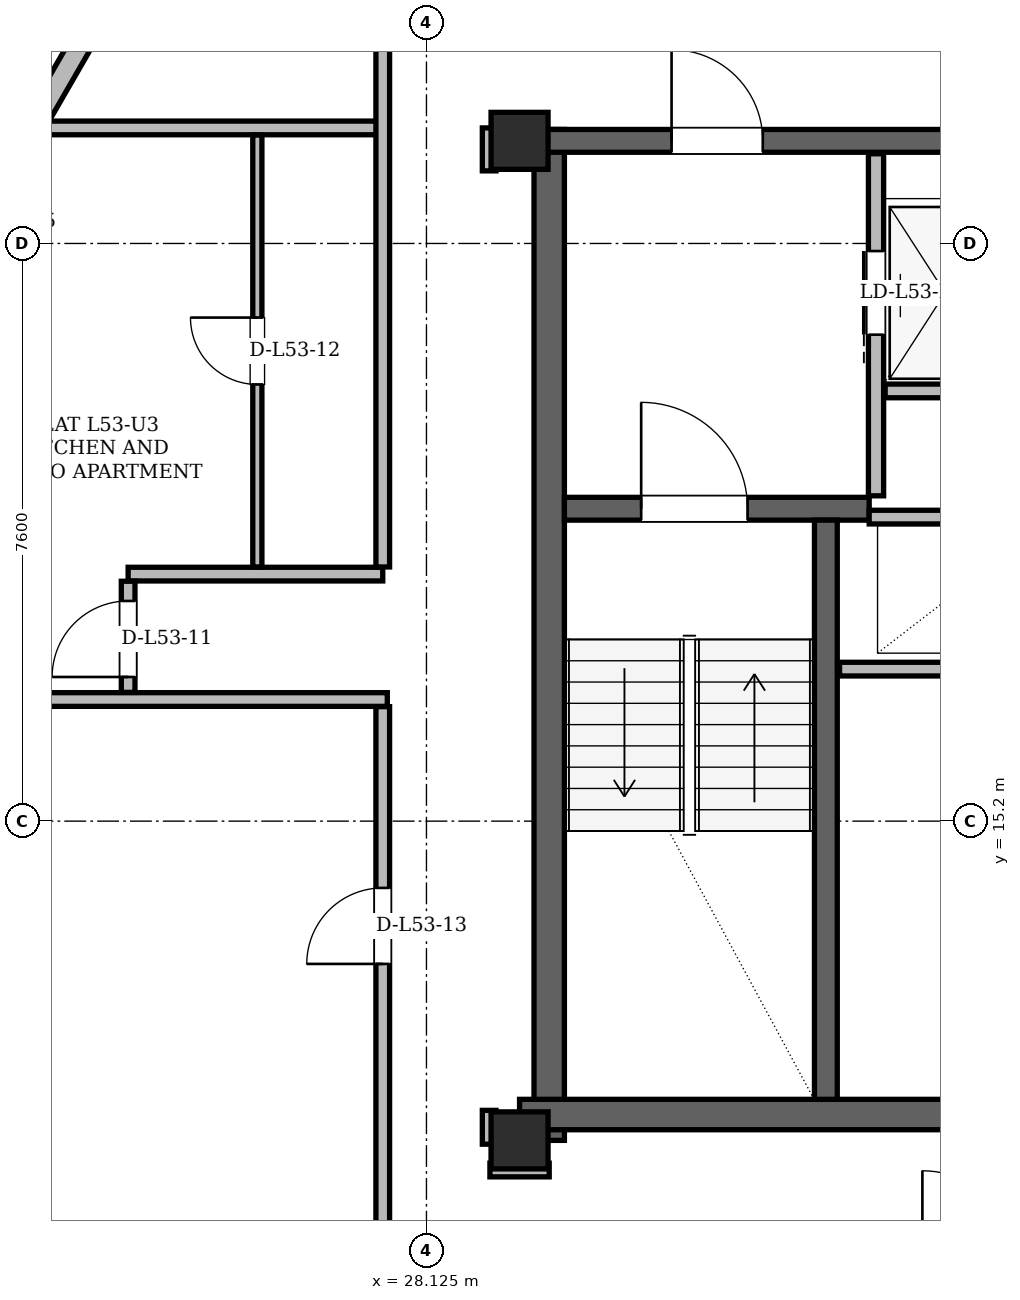
"""IFC4 building model, lengths in metres.
Left out: names, types, materials, properties, quantities, classifications, styles, units other than length and angle.
Written with IfcOpenShell. Run it as: python <this file> out.ifc"""

import sys

from ifc_helpers import new_model, si_unit, direction, frame, frame_2d, origin, origin_2d, place, context, subcontext, project, spatial, rectangle, hollow_rectangle, extrude, element, fill, save


model = new_model("IFC4")
c1 = context("Model", 3, precision=1e-05, world=origin(), true_north=direction((0.0, 1.0)))
c2 = subcontext(c1, "Body", "Model", "MODEL_VIEW")
j1 = project(units=[si_unit("LENGTHUNIT", "METRE"), si_unit("PLANEANGLEUNIT", "RADIAN")], contexts=[c1])
p1 = place(None, origin())
s1 = spatial("IfcSite", under=j1, at=p1, CompositionType="ELEMENT")
p2 = place(p1, origin())
s2 = spatial("IfcBuilding", under=s1, at=p2, CompositionType="ELEMENT")
p3 = place(p2, frame((0.0, 0.0, 201.0)))
s3 = spatial("IfcBuildingStorey", under=s2, at=p3, CompositionType="ELEMENT", Elevation=201.0)
for number, where, z_axis, x_axis in (
    (1, (29.35, 11.0, 0.0), (0.0, 0.0, 1.0), (1.0, 0.0, 0.0)),
    (2, (29.35, 24.15, 0.0), (0.0, 0.0, 1.0), (1.0, 0.0, 0.0)),
):
    element("IfcColumn", number, at=place(p3, frame(where, z_axis=z_axis, x_axis=x_axis)), inside=s3, PredefinedType="COLUMN", context=c2, shape_type="SweptSolid", body=[
        extrude(hollow_rectangle(XDim=0.75, YDim=0.75, WallThickness=0.06, at=origin_2d()), origin(), (0.0, 0.0, 1.0), 3.6),
    ])
p4 = place(p3, frame((29.74, 11.0, 0.0), z_axis=(0.0, 0.0, 1.0), x_axis=(0.0, 1.0, 0.0)))
e3 = element("IfcWall", 3, at=p4, inside=s3, PredefinedType="SHEAR", context=c2, shape_type="SweptSolid", body=[
    extrude(rectangle(XDim=13.3, YDim=0.4, at=frame_2d((6.65, 0.0))), origin(), (0.0, 0.0, 1.0), 3.38),
])
p5 = place(p3, frame((29.35, 11.34, 0.0), z_axis=(0.0, 0.0, 1.0), x_axis=(1.0, 0.0, 0.0)))
e4 = element("IfcWall", 4, at=p5, inside=s3, PredefinedType="SHEAR", context=c2, shape_type="SweptSolid", body=[
    extrude(rectangle(XDim=7.1, YDim=0.4, at=frame_2d((3.55, 0.0))), origin(), (0.0, 0.0, 1.0), 3.38),
])
p6 = place(p3, frame((29.65, 24.15, 0.0), z_axis=(0.0, 0.0, 1.0), x_axis=(1.0, 0.0, 0.0)))
e5 = element("IfcWall", 5, at=p6, inside=s3, PredefinedType="SHEAR", context=c2, shape_type="SweptSolid", body=[
    extrude(rectangle(XDim=15.7, YDim=0.3, at=frame_2d((7.85, 0.0))), origin(), (0.0, 0.0, 1.0), 3.38),
])
p7 = place(p6, frame((1.7, 0.0, 0.0)))
e6 = element("IfcOpeningElement", 6, at=p7, cuts=e5, PredefinedType="OPENING", context=c2, shape_type="SweptSolid", body=[
    extrude(rectangle(XDim=1.2, YDim=2.2, at=frame_2d((0.6, 1.1))), frame((0.0, 0.15, 0.0), z_axis=(0.0, -1.0, 0.0), x_axis=(1.0, 0.0, 0.0)), (0.0, 0.0, 1.0), 0.3),
])
p8 = place(p6, frame((12.8, 0.0, 0.0)))
e7 = element("IfcOpeningElement", 7, at=p8, cuts=e5, PredefinedType="OPENING", context=c2, shape_type="SweptSolid", body=[
    extrude(rectangle(XDim=1.2, YDim=2.2, at=frame_2d((0.6, 1.1))), frame((0.0, 0.15, 0.0), z_axis=(0.0, -1.0, 0.0), x_axis=(1.0, 0.0, 0.0)), (0.0, 0.0, 1.0), 0.3),
])
p9 = place(p6, frame((6.55, 0.0, 0.0)))
e8 = element("IfcOpeningElement", 8, at=p9, cuts=e5, PredefinedType="OPENING", context=c2, shape_type="SweptSolid", body=[
    extrude(rectangle(XDim=0.9, YDim=2.05, at=frame_2d((0.45, 1.025))), frame((0.0, 0.15, 0.0), z_axis=(0.0, -1.0, 0.0), x_axis=(1.0, 0.0, 0.0)), (0.0, 0.0, 1.0), 0.3),
])
p10 = place(p6, frame((8.45, 0.0, 0.0)))
e9 = element("IfcOpeningElement", 9, at=p10, cuts=e5, PredefinedType="OPENING", context=c2, shape_type="SweptSolid", body=[
    extrude(rectangle(XDim=0.9, YDim=2.05, at=frame_2d((0.45, 1.025))), frame((0.0, 0.15, 0.0), z_axis=(0.0, -1.0, 0.0), x_axis=(1.0, 0.0, 0.0)), (0.0, 0.0, 1.0), 0.3),
])
p11 = place(p3, frame((29.94, 19.31, 0.0), z_axis=(0.0, 0.0, 1.0), x_axis=(1.0, 0.0, 0.0)))
e10 = element("IfcWall", 10, at=p11, inside=s3, PredefinedType="SHEAR", context=c2, shape_type="SweptSolid", body=[
    extrude(rectangle(XDim=4.01, YDim=0.3, at=frame_2d((2.005, 0.0))), origin(), (0.0, 0.0, 1.0), 3.38),
])
p12 = place(p11, frame((1.01, 0.0, 0.0)))
e11 = element("IfcOpeningElement", 11, at=p12, cuts=e10, PredefinedType="OPENING", context=c2, shape_type="SweptSolid", body=[
    extrude(rectangle(XDim=1.4, YDim=2.2, at=frame_2d((0.7, 1.1))), frame((0.0, 0.15, 0.0), z_axis=(0.0, -1.0, 0.0), x_axis=(1.0, 0.0, 0.0)), (0.0, 0.0, 1.0), 0.3),
])
p13 = place(p3, frame((33.38, 11.54, 0.0), z_axis=(0.0, 0.0, 1.0), x_axis=(0.0, 1.0, 0.0)))
e12 = element("IfcWall", 12, at=p13, inside=s3, PredefinedType="SHEAR", context=c2, shape_type="SweptSolid", body=[
    extrude(rectangle(XDim=7.62, YDim=0.3, at=frame_2d((3.81, 0.0))), origin(), (0.0, 0.0, 1.0), 3.38),
])
p14 = place(p3, frame((33.841, 43.2, 0.0), z_axis=(0.0, 0.0, 1.0), x_axis=(-0.500001310321, -0.866024647269, 0.0)))
e13 = element("IfcWall", 13, at=p14, inside=s3, PredefinedType="SOLIDWALL", context=c2, shape_type="SweptSolid", body=[
    extrude(rectangle(XDim=36.352, YDim=0.29, at=frame_2d((18.176, 0.0))), origin(), (0.0, 0.0, 1.0), 2.677),
])
p15 = place(p14, frame((6.579, 0.0, 0.0)))
e14 = element("IfcOpeningElement", 14, at=p15, cuts=e13, PredefinedType="OPENING", context=c2, shape_type="SweptSolid", body=[
    extrude(rectangle(XDim=1.5, YDim=2.2, at=frame_2d((0.75, 1.1))), frame((0.0, 0.145, 0.0), z_axis=(0.0, -1.0, 0.0), x_axis=(1.0, 0.0, 0.0)), (0.0, 0.0, 1.0), 0.29),
])
p16 = place(p14, frame((26.818, 0.0, 0.0)))
e15 = element("IfcOpeningElement", 15, at=p16, cuts=e13, PredefinedType="OPENING", context=c2, shape_type="SweptSolid", body=[
    extrude(rectangle(XDim=1.5, YDim=2.2, at=frame_2d((0.75, 1.1))), frame((0.0, 0.145, 0.0), z_axis=(0.0, -1.0, 0.0), x_axis=(1.0, 0.0, 0.0)), (0.0, 0.0, 1.0), 0.29),
])
p17 = place(p14, frame((32.924, 0.0, 0.85)))
e16 = element("IfcOpeningElement", 16, at=p17, cuts=e13, PredefinedType="OPENING", context=c2, shape_type="SweptSolid", body=[
    extrude(rectangle(XDim=1.2, YDim=1.48, at=frame_2d((0.6, 0.74))), frame((0.0, 0.145, 0.0), z_axis=(0.0, -1.0, 0.0), x_axis=(1.0, 0.0, 0.0)), (0.0, 0.0, 1.0), 0.29),
])
p18 = place(p14, frame((21.949, 0.0, 0.85)))
e17 = element("IfcOpeningElement", 17, at=p18, cuts=e13, PredefinedType="OPENING", context=c2, shape_type="SweptSolid", body=[
    extrude(rectangle(XDim=2.0, YDim=1.717, at=frame_2d((1.0, 0.858))), frame((0.0, 0.145, 0.0), z_axis=(0.0, -1.0, 0.0), x_axis=(1.0, 0.0, 0.0)), (0.0, 0.0, 1.0), 0.29),
])
p19 = place(p14, frame((2.823, 0.0, 0.85)))
e18 = element("IfcOpeningElement", 18, at=p19, cuts=e13, PredefinedType="OPENING", context=c2, shape_type="SweptSolid", body=[
    extrude(rectangle(XDim=1.6, YDim=1.7, at=frame_2d((0.8, 0.85))), frame((0.0, 0.145, 0.0), z_axis=(0.0, -1.0, 0.0), x_axis=(1.0, 0.0, 0.0)), (0.0, 0.0, 1.0), 0.29),
])
p20 = place(p14, frame((15.99, 0.0, 0.85)))
e19 = element("IfcOpeningElement", 19, at=p20, cuts=e13, PredefinedType="OPENING", context=c2, shape_type="SweptSolid", body=[
    extrude(rectangle(XDim=3.0, YDim=1.717, at=frame_2d((1.5, 0.858))), frame((0.0, 0.145, 0.0), z_axis=(0.0, -1.0, 0.0), x_axis=(1.0, 0.0, 0.0)), (0.0, 0.0, 1.0), 0.29),
])
p21 = place(p3, frame((34.04, 19.48, 0.0), z_axis=(0.0, 0.0, 1.0), x_axis=(0.0, 1.0, 0.0)))
e20 = element("IfcWall", 20, at=p21, inside=s3, PredefinedType="PARTITIONING", context=c2, shape_type="SweptSolid", body=[
    extrude(rectangle(XDim=4.5, YDim=0.2, at=frame_2d((2.25, 0.0))), origin(), (0.0, 0.0, 1.0), 3.38),
])
p22 = place(p21, frame((2.12, 0.0, 0.0)))
e21 = element("IfcOpeningElement", 21, at=p22, cuts=e20, PredefinedType="OPENING", context=c2, shape_type="SweptSolid", body=[
    extrude(rectangle(XDim=1.1, YDim=2.2, at=frame_2d((0.55, 1.1))), frame((0.0, 0.1, 0.0), z_axis=(0.0, -1.0, 0.0), x_axis=(1.0, 0.0, 0.0)), (0.0, 0.0, 1.0), 0.2),
])
p23 = place(p3, frame((34.16, 20.86, 0.0), z_axis=(0.0, 0.0, 1.0), x_axis=(1.0, 0.0, 0.0)))
e22 = element("IfcWall", 22, at=p23, inside=s3, PredefinedType="PARTITIONING", context=c2, shape_type="SweptSolid", body=[
    extrude(rectangle(XDim=1.58, YDim=0.18, at=frame_2d((0.79, 0.0))), origin(), (0.0, 0.0, 1.0), 3.38),
])
p24 = place(p3, frame((33.95, 19.2, 0.0), z_axis=(0.0, 0.0, 1.0), x_axis=(1.0, 0.0, 0.0)))
e23 = element("IfcWall", 23, at=p24, inside=s3, PredefinedType="PARTITIONING", context=c2, shape_type="SweptSolid", body=[
    extrude(rectangle(XDim=2.27, YDim=0.18, at=frame_2d((1.135, 0.0))), origin(), (0.0, 0.0, 1.0), 3.38),
])
p25 = place(p3, frame((33.56, 17.2, 0.0), z_axis=(0.0, 0.0, 1.0), x_axis=(1.0, 0.0, 0.0)))
e24 = element("IfcWall", 24, at=p25, inside=s3, PredefinedType="PARTITIONING", context=c2, shape_type="SweptSolid", body=[
    extrude(rectangle(XDim=2.66, YDim=0.18, at=frame_2d((1.33, 0.0))), origin(), (0.0, 0.0, 1.0), 3.38),
])
p26 = place(p3, frame((28.96, 10.61, 0.0), z_axis=(0.0, 0.0, 1.0), x_axis=(1.0, 0.0, 0.0)))
e25 = element("IfcWall", 25, at=p26, inside=s3, PredefinedType="PARTITIONING", context=c2, shape_type="SweptSolid", body=[
    extrude(rectangle(XDim=0.78, YDim=0.18, at=frame_2d((0.39, 0.0))), origin(), (0.0, 0.0, 1.0), 3.38),
])
p27 = place(p3, frame((18.806, 16.8, 0.0), z_axis=(0.0, 0.0, 1.0), x_axis=(1.0, 0.0, 0.0)))
e26 = element("IfcWall", 26, at=p27, inside=s3, PredefinedType="PARTITIONING", context=c2, shape_type="SweptSolid", body=[
    extrude(rectangle(XDim=8.804, YDim=0.18, at=frame_2d((4.402, 0.0))), origin(), (0.0, 0.0, 1.0), 3.38),
])
p28 = place(p3, frame((24.2, 18.45, 0.0), z_axis=(0.0, 0.0, 1.0), x_axis=(1.0, 0.0, 0.0)))
e27 = element("IfcWall", 27, at=p28, inside=s3, PredefinedType="PARTITIONING", context=c2, shape_type="SweptSolid", body=[
    extrude(rectangle(XDim=3.35, YDim=0.18, at=frame_2d((1.675, 0.0))), origin(), (0.0, 0.0, 1.0), 3.38),
])
p29 = place(p3, frame((23.112, 24.32, 0.0), z_axis=(0.0, 0.0, 1.0), x_axis=(1.0, 0.0, 0.0)))
e28 = element("IfcWall", 28, at=p29, inside=s3, PredefinedType="PARTITIONING", context=c2, shape_type="SweptSolid", body=[
    extrude(rectangle(XDim=4.498, YDim=0.18, at=frame_2d((2.249, 0.0))), origin(), (0.0, 0.0, 1.0), 3.38),
])
p30 = place(p3, frame((24.2, 16.894, 0.0), z_axis=(0.0, 0.0, 1.0), x_axis=(0.0, 1.0, 0.0)))
e29 = element("IfcWall", 29, at=p30, inside=s3, PredefinedType="PARTITIONING", context=c2, shape_type="SweptSolid", body=[
    extrude(rectangle(XDim=1.462, YDim=0.18, at=frame_2d((0.731, 0.0))), origin(), (0.0, 0.0, 1.0), 3.38),
])
p31 = place(p30, frame((0.203, 0.0, 0.0)))
e30 = element("IfcOpeningElement", 30, at=p31, cuts=e29, PredefinedType="OPENING", context=c2, shape_type="SweptSolid", body=[
    extrude(rectangle(XDim=1.0, YDim=2.18, at=frame_2d((0.5, 1.09))), frame((0.0, 0.09, 0.0), z_axis=(0.0, -1.0, 0.0), x_axis=(1.0, 0.0, 0.0)), (0.0, 0.0, 1.0), 0.18),
])
p32 = place(p3, frame((25.9, 18.544, 0.0), z_axis=(0.0, 0.0, 1.0), x_axis=(0.0, 1.0, 0.0)))
e31 = element("IfcWall", 31, at=p32, inside=s3, PredefinedType="PARTITIONING", context=c2, shape_type="SweptSolid", body=[
    extrude(rectangle(XDim=5.682, YDim=0.12, at=frame_2d((2.841, 0.0))), origin(), (0.0, 0.0, 1.0), 3.38),
])
p33 = place(p32, frame((2.401, 0.0, 0.0)))
e32 = element("IfcOpeningElement", 32, at=p33, cuts=e31, PredefinedType="OPENING", context=c2, shape_type="SweptSolid", body=[
    extrude(rectangle(XDim=0.88, YDim=2.08, at=frame_2d((0.44, 1.04))), frame((0.0, 0.06, 0.0), z_axis=(0.0, -1.0, 0.0), x_axis=(1.0, 0.0, 0.0)), (0.0, 0.0, 1.0), 0.12),
])
p34 = place(p3, frame((27.55, 9.394, 0.0), z_axis=(0.0, 0.0, 1.0), x_axis=(0.0, 1.0, 0.0)))
e33 = element("IfcWall", 33, at=p34, inside=s3, PredefinedType="PARTITIONING", context=c2, shape_type="SweptSolid", body=[
    extrude(rectangle(XDim=7.312, YDim=0.18, at=frame_2d((3.656, 0.0))), origin(), (0.0, 0.0, 1.0), 2.913),
])
p35 = place(p34, frame((3.927, 0.0, 0.0)))
e34 = element("IfcOpeningElement", 34, at=p35, cuts=e33, PredefinedType="OPENING", context=c2, shape_type="SweptSolid", body=[
    extrude(rectangle(XDim=1.0, YDim=2.18, at=frame_2d((0.5, 1.09))), frame((0.0, 0.09, 0.0), z_axis=(0.0, -1.0, 0.0), x_axis=(1.0, 0.0, 0.0)), (0.0, 0.0, 1.0), 0.18),
])
p36 = place(p3, frame((27.55, 18.544, 0.0), z_axis=(0.0, 0.0, 1.0), x_axis=(0.0, 1.0, 0.0)))
e35 = element("IfcWall", 35, at=p36, inside=s3, PredefinedType="PARTITIONING", context=c2, shape_type="SweptSolid", body=[
    extrude(rectangle(XDim=7.332, YDim=0.18, at=frame_2d((3.666, 0.0))), origin(), (0.0, 0.0, 1.0), 3.38),
])
p37 = place(p3, frame((28.95, 10.95, 0.0), z_axis=(0.0, 0.0, 1.0), x_axis=(0.0, 1.0, 0.0)))
e36 = element("IfcWall", 36, at=p37, inside=s3, PredefinedType="PARTITIONING", context=c2, shape_type="SweptSolid", body=[
    extrude(rectangle(XDim=0.445, YDim=0.18, at=frame_2d((0.223, 0.0))), origin(), (0.0, 0.0, 1.0), 2.913),
])
p38 = place(p3, frame((28.95, 23.755, 0.0), z_axis=(0.0, 0.0, 1.0), x_axis=(0.0, 1.0, 0.0)))
e37 = element("IfcWall", 37, at=p38, inside=s3, PredefinedType="PARTITIONING", context=c2, shape_type="SweptSolid", body=[
    extrude(rectangle(XDim=0.565, YDim=0.18, at=frame_2d((0.283, 0.0))), origin(), (0.0, 0.0, 1.0), 3.38),
])
p39 = place(p22, origin())
e38 = element("IfcDoor", 38, at=p39, inside=s3, OperationType="SLIDING_TO_LEFT", PredefinedType="DOOR", context=c2, shape_type="SweptSolid", body=[
    extrude(rectangle(XDim=1.1, YDim=2.2, at=frame_2d((0.55, 1.1))), frame((0.0, 0.025, 0.0), z_axis=(0.0, -1.0, 0.0), x_axis=(1.0, 0.0, 0.0)), (0.0, 0.0, 1.0), 0.05),
])
fill(e21, e38)
p40 = place(p12, origin())
e39 = element("IfcDoor", 39, at=p40, inside=s3, OperationType="SINGLE_SWING_LEFT", PredefinedType="DOOR", context=c2, shape_type="SweptSolid", body=[
    extrude(rectangle(XDim=1.4, YDim=2.2, at=frame_2d((0.7, 1.1))), frame((0.0, 0.025, 0.0), z_axis=(0.0, -1.0, 0.0), x_axis=(1.0, 0.0, 0.0)), (0.0, 0.0, 1.0), 0.05),
])
fill(e11, e39)
p41 = place(p7, origin())
e40 = element("IfcDoor", 40, at=p41, inside=s3, OperationType="SINGLE_SWING_LEFT", PredefinedType="DOOR", context=c2, shape_type="SweptSolid", body=[
    extrude(rectangle(XDim=1.2, YDim=2.2, at=frame_2d((0.6, 1.1))), frame((0.0, 0.025, 0.0), z_axis=(0.0, -1.0, 0.0), x_axis=(1.0, 0.0, 0.0)), (0.0, 0.0, 1.0), 0.05),
])
fill(e6, e40)
p42 = place(p31, origin())
e41 = element("IfcDoor", 41, at=p42, inside=s3, OperationType="SINGLE_SWING_LEFT", PredefinedType="DOOR", context=c2, shape_type="SweptSolid", body=[
    extrude(rectangle(XDim=1.0, YDim=2.18, at=frame_2d((0.5, 1.09))), frame((0.0, 0.025, 0.0), z_axis=(0.0, -1.0, 0.0), x_axis=(1.0, 0.0, 0.0)), (0.0, 0.0, 1.0), 0.05),
])
fill(e30, e41)
p43 = place(p33, origin())
e42 = element("IfcDoor", 42, at=p43, inside=s3, OperationType="SINGLE_SWING_RIGHT", PredefinedType="DOOR", context=c2, shape_type="SweptSolid", body=[
    extrude(rectangle(XDim=0.88, YDim=2.08, at=frame_2d((0.44, 1.04))), frame((0.0, 0.025, 0.0), z_axis=(0.0, -1.0, 0.0), x_axis=(1.0, 0.0, 0.0)), (0.0, 0.0, 1.0), 0.05),
])
fill(e32, e42)
p44 = place(p35, origin())
e43 = element("IfcDoor", 43, at=p44, inside=s3, OperationType="SINGLE_SWING_LEFT", PredefinedType="DOOR", context=c2, shape_type="SweptSolid", body=[
    extrude(rectangle(XDim=1.0, YDim=2.18, at=frame_2d((0.5, 1.09))), frame((0.0, 0.025, 0.0), z_axis=(0.0, -1.0, 0.0), x_axis=(1.0, 0.0, 0.0)), (0.0, 0.0, 1.0), 0.05),
])
fill(e34, e43)
save(model, sys.argv[1])
